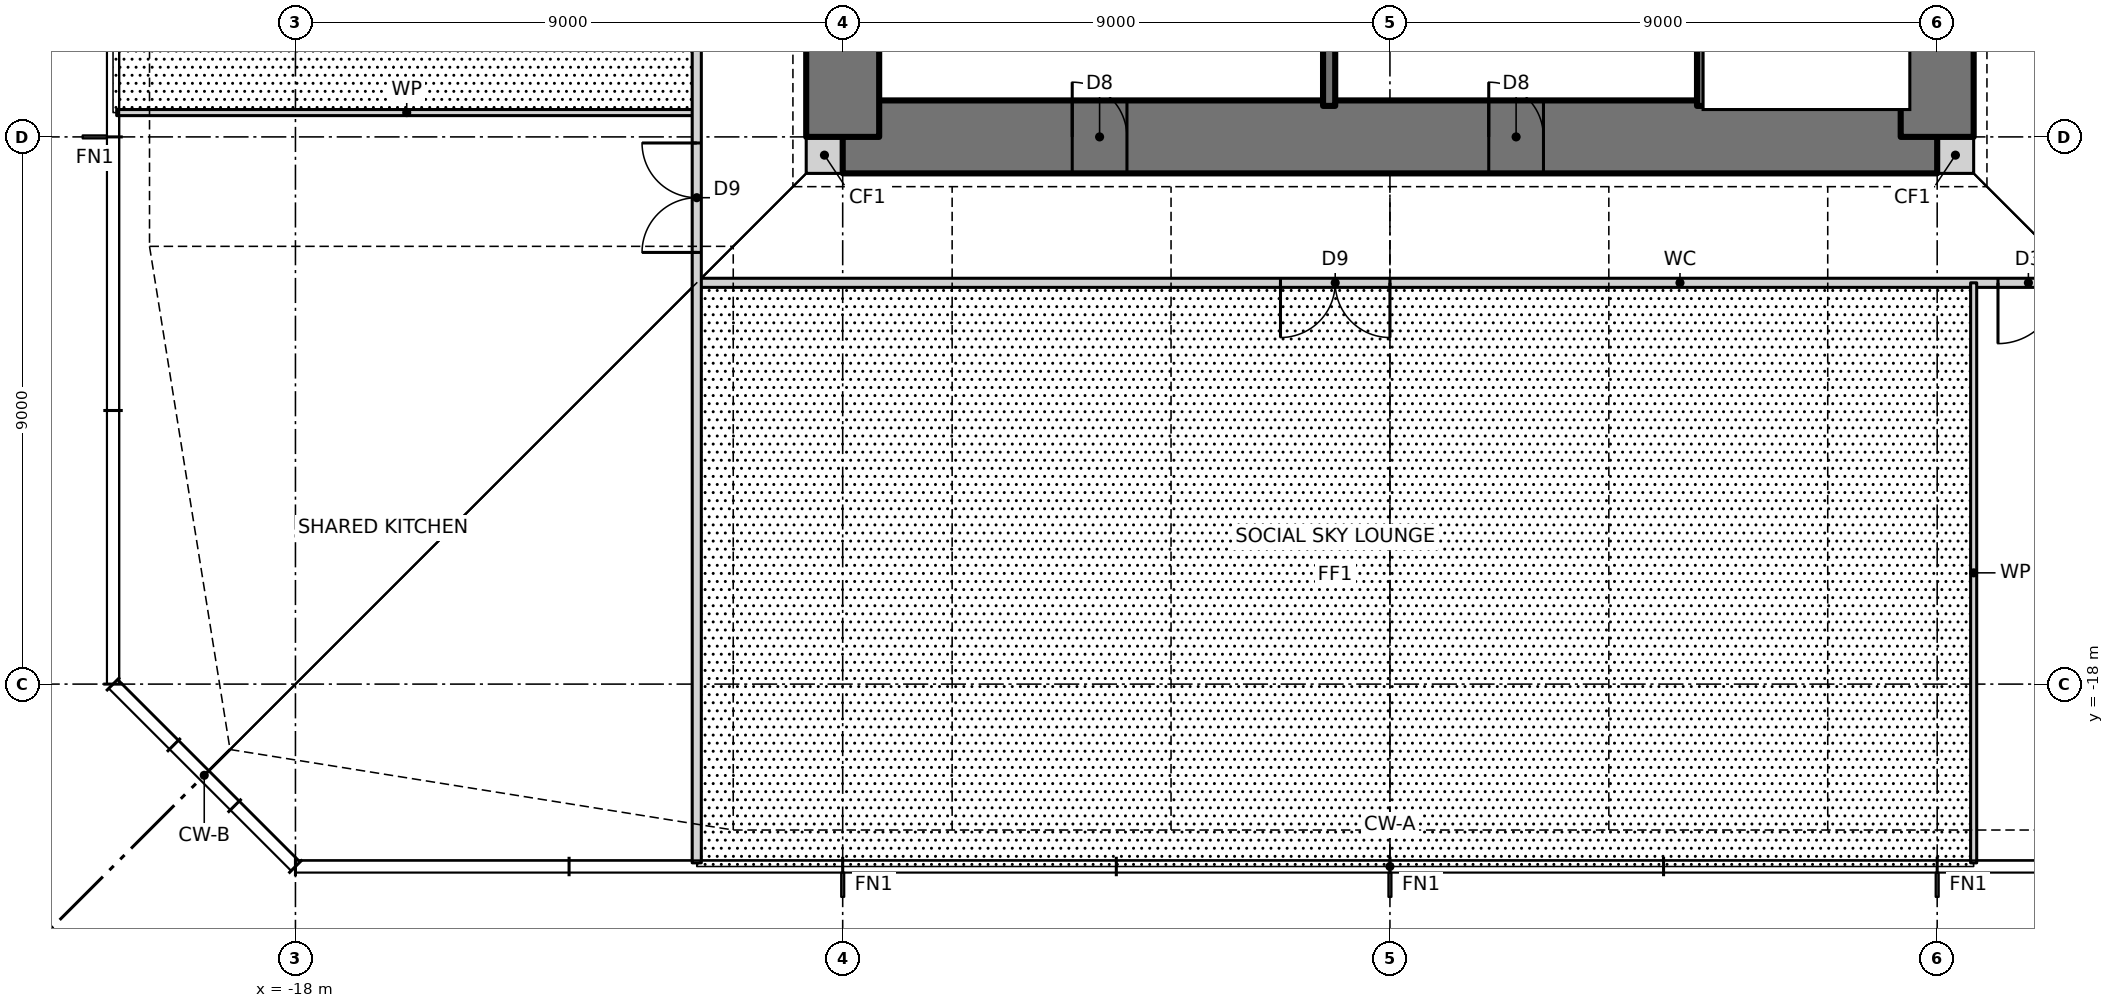
"""IFC4 building model, lengths in metres.
Left out: names, types, materials, properties, quantities, classifications, styles, units other than length and angle.
Written with IfcOpenShell. Run it as: python <this file> out.ifc"""

import sys

from ifc_helpers import new_model, si_unit, direction, frame, frame_2d, origin, place, context, subcontext, project, spatial, rectangle, extrude, element, fill, save


model = new_model("IFC4")
c1 = context("Model", 3, precision=1e-05, world=origin(), true_north=direction((0.0, 1.0)))
c2 = subcontext(c1, "Body", "Model", "MODEL_VIEW")
j1 = project(units=[si_unit("LENGTHUNIT", "METRE"), si_unit("PLANEANGLEUNIT", "RADIAN")], contexts=[c1])
p1 = place(None, origin())
s1 = spatial("IfcSite", under=j1, at=p1, CompositionType="ELEMENT")
p2 = place(p1, origin())
s2 = spatial("IfcBuilding", under=s1, at=p2, CompositionType="ELEMENT")
p3 = place(p2, frame((0.0, 0.0, 80.5)))
s3 = spatial("IfcBuildingStorey", under=s2, at=p3, CompositionType="ELEMENT", Elevation=80.5)
for number, where, z_axis, x_axis in (
    (1, (-9.6, -9.3, 0.0), (0.0, 0.0, 1.0), (1.0, 0.0, 0.0)),
    (2, (9.0, -9.3, 0.0), (0.0, 0.0, 1.0), (1.0, 0.0, 0.0)),
):
    element("IfcWall", number, at=place(p3, frame(where, z_axis=z_axis, x_axis=x_axis)), inside=s3, PredefinedType="SOLIDWALL", context=c2, shape_type="SweptSolid", body=[
        extrude(rectangle(XDim=0.6, YDim=0.6, at=frame_2d((0.3, 0.0))), origin(), (0.0, 0.0, 1.0), 3.5),
    ])
p4 = place(p3, frame((-9.0, -9.0, 0.0), z_axis=(0.0, 0.0, 1.0), x_axis=(1.0, 0.0, 0.0)))
e3 = element("IfcWall", 3, at=p4, inside=s3, PredefinedType="SHEAR", context=c2, shape_type="SweptSolid", body=[
    extrude(rectangle(XDim=18.0, YDim=1.2, at=frame_2d((9.0, 0.0))), origin(), (0.0, 0.0, 1.0), 3.5),
])
p5 = place(p4, frame((3.775, 0.0, 0.0)))
e4 = element("IfcOpeningElement", 4, at=p5, cuts=e3, PredefinedType="OPENING", context=c2, shape_type="SweptSolid", body=[
    extrude(rectangle(XDim=0.9, YDim=2.1, at=frame_2d((0.45, 1.05))), frame((0.0, 0.61, 0.0), z_axis=(0.0, -1.0, 0.0), x_axis=(1.0, 0.0, 0.0)), (0.0, 0.0, 1.0), 1.22),
])
p6 = place(p4, frame((10.625, 0.0, 0.0)))
e5 = element("IfcOpeningElement", 5, at=p6, cuts=e3, PredefinedType="OPENING", context=c2, shape_type="SweptSolid", body=[
    extrude(rectangle(XDim=0.9, YDim=2.1, at=frame_2d((0.45, 1.05))), frame((0.0, 0.61, 0.0), z_axis=(0.0, -1.0, 0.0), x_axis=(1.0, 0.0, 0.0)), (0.0, 0.0, 1.0), 1.22),
])
p7 = place(p3, frame((9.0, -9.0, 0.0), z_axis=(0.0, 0.0, 1.0), x_axis=(0.0, 1.0, 0.0)))
e6 = element("IfcWall", 6, at=p7, inside=s3, PredefinedType="SHEAR", context=c2, shape_type="SweptSolid", body=[
    extrude(rectangle(XDim=18.0, YDim=1.2, at=frame_2d((9.0, 0.0))), origin(), (0.0, 0.0, 1.0), 3.5),
])
p8 = place(p7, frame((8.5, 0.0, 0.0)))
e7 = element("IfcOpeningElement", 7, at=p8, cuts=e6, PredefinedType="OPENING", context=c2, shape_type="SweptSolid", body=[
    extrude(rectangle(XDim=1.0, YDim=2.1, at=frame_2d((0.5, 1.05))), frame((0.0, 0.61, 0.0), z_axis=(0.0, -1.0, 0.0), x_axis=(1.0, 0.0, 0.0)), (0.0, 0.0, 1.0), 1.22),
])
p9 = place(p3, frame((-9.0, 9.0, 0.0), z_axis=(0.0, 0.0, 1.0), x_axis=(0.0, -1.0, 0.0)))
e8 = element("IfcWall", 8, at=p9, inside=s3, PredefinedType="SHEAR", context=c2, shape_type="SweptSolid", body=[
    extrude(rectangle(XDim=18.0, YDim=1.2, at=frame_2d((9.0, 0.0))), origin(), (0.0, 0.0, 1.0), 3.5),
])
p10 = place(p9, frame((8.5, 0.0, 0.0)))
e9 = element("IfcOpeningElement", 9, at=p10, cuts=e8, PredefinedType="OPENING", context=c2, shape_type="SweptSolid", body=[
    extrude(rectangle(XDim=1.0, YDim=2.1, at=frame_2d((0.5, 1.05))), frame((0.0, 0.61, 0.0), z_axis=(0.0, -1.0, 0.0), x_axis=(1.0, 0.0, 0.0)), (0.0, 0.0, 1.0), 1.22),
])
p11 = place(p3, frame((-11.4, -11.4, 0.0), z_axis=(0.0, 0.0, 1.0), x_axis=(1.0, 0.0, 0.0)))
e10 = element("IfcWall", 10, at=p11, inside=s3, PredefinedType="PARTITIONING", context=c2, shape_type="SweptSolid", body=[
    extrude(rectangle(XDim=32.34, YDim=0.15, at=frame_2d((16.17, 0.0))), origin(), (0.0, 0.0, 1.0), 3.27),
])
p12 = place(p11, frame((9.6, 0.0, 0.0)))
e11 = element("IfcOpeningElement", 11, at=p12, cuts=e10, PredefinedType="OPENING", context=c2, shape_type="SweptSolid", body=[
    extrude(rectangle(XDim=1.8, YDim=2.1, at=frame_2d((0.9, 1.05))), frame((0.0, 0.085, 0.0), z_axis=(0.0, -1.0, 0.0), x_axis=(1.0, 0.0, 0.0)), (0.0, 0.0, 1.0), 0.17),
])
p13 = place(p11, frame((21.4, 0.0, 0.0)))
e12 = element("IfcOpeningElement", 12, at=p13, cuts=e10, PredefinedType="OPENING", context=c2, shape_type="SweptSolid", body=[
    extrude(rectangle(XDim=1.0, YDim=2.1, at=frame_2d((0.5, 1.05))), frame((0.0, 0.085, 0.0), z_axis=(0.0, -1.0, 0.0), x_axis=(1.0, 0.0, 0.0)), (0.0, 0.0, 1.0), 0.17),
])
for number, where, z_axis, x_axis in (
    (13, (-20.94, -8.6, 0.0), (0.0, 0.0, 1.0), (1.0, 0.0, 0.0)),
    (14, (9.6, -20.94, 0.0), (0.0, 0.0, 1.0), (0.0, 1.0, 0.0)),
):
    element("IfcWall", number, at=place(p3, frame(where, z_axis=z_axis, x_axis=x_axis)), inside=s3, PredefinedType="PARTITIONING", context=c2, shape_type="SweptSolid", body=[
        extrude(rectangle(XDim=9.54, YDim=0.1, at=frame_2d((4.77, 0.0))), origin(), (0.0, 0.0, 1.0), 3.27),
    ])
p14 = place(p3, frame((5.15, -8.49, 0.0), z_axis=(0.0, 0.0, 1.0), x_axis=(0.0, 1.0, 0.0)))
e15 = element("IfcWall", 15, at=p14, inside=s3, PredefinedType="SOLIDWALL", context=c2, shape_type="SweptSolid", body=[
    extrude(rectangle(XDim=13.09, YDim=0.2, at=frame_2d((6.545, 0.0))), origin(), (0.0, 0.0, 1.0), 3.5),
])
p15 = place(p14, frame((7.89, 0.0, 0.0)))
e16 = element("IfcOpeningElement", 16, at=p15, cuts=e15, PredefinedType="OPENING", context=c2, shape_type="SweptSolid", body=[
    extrude(rectangle(XDim=1.2, YDim=2.1, at=frame_2d((0.6, 1.05))), frame((0.0, 0.11, 0.0), z_axis=(0.0, -1.0, 0.0), x_axis=(1.0, 0.0, 0.0)), (0.0, 0.0, 1.0), 0.22),
])
p16 = place(p3, frame((-1.0, -8.49, 0.0), z_axis=(0.0, 0.0, 1.0), x_axis=(0.0, 1.0, 0.0)))
e17 = element("IfcWall", 17, at=p16, inside=s3, PredefinedType="SOLIDWALL", context=c2, shape_type="SweptSolid", body=[
    extrude(rectangle(XDim=4.09, YDim=0.2, at=frame_2d((2.045, 0.0))), origin(), (0.0, 0.0, 1.0), 3.5),
])
p17 = place(p3, frame((-11.4, -20.94, 0.0), z_axis=(0.0, 0.0, 1.0), x_axis=(0.0, 1.0, 0.0)))
e18 = element("IfcWall", 18, at=p17, inside=s3, PredefinedType="PARTITIONING", context=c2, shape_type="SweptSolid", body=[
    extrude(rectangle(XDim=32.34, YDim=0.15, at=frame_2d((16.17, 0.0))), origin(), (0.0, 0.0, 1.0), 3.27),
])
p18 = place(p17, frame((21.44, 0.0, 0.0)))
e19 = element("IfcOpeningElement", 19, at=p18, cuts=e18, PredefinedType="OPENING", context=c2, shape_type="SweptSolid", body=[
    extrude(rectangle(XDim=1.8, YDim=2.1, at=frame_2d((0.9, 1.05))), frame((0.0, 0.085, 0.0), z_axis=(0.0, -1.0, 0.0), x_axis=(1.0, 0.0, 0.0)), (0.0, 0.0, 1.0), 0.17),
])
p19 = place(p17, frame((10.04, 0.0, 0.0)))
e20 = element("IfcOpeningElement", 20, at=p19, cuts=e18, PredefinedType="OPENING", context=c2, shape_type="SweptSolid", body=[
    extrude(rectangle(XDim=1.8, YDim=2.1, at=frame_2d((0.9, 1.05))), frame((0.0, 0.085, 0.0), z_axis=(0.0, -1.0, 0.0), x_axis=(1.0, 0.0, 0.0)), (0.0, 0.0, 1.0), 0.17),
])
p20 = place(p12, frame((1.8, 0.0, 0.0), z_axis=(0.0, 0.0, 1.0), x_axis=(-1.0, 0.0, 0.0)))
e21 = element("IfcDoor", 21, at=p20, inside=s3, OperationType="DOUBLE_DOOR_SINGLE_SWING", PredefinedType="DOOR", context=c2, shape_type="SweptSolid", body=[
    extrude(rectangle(XDim=1.8, YDim=2.1, at=frame_2d((0.9, 1.05))), frame((0.0, 0.025, 0.0), z_axis=(0.0, -1.0, 0.0), x_axis=(1.0, 0.0, 0.0)), (0.0, 0.0, 1.0), 0.05),
])
fill(e11, e21)
p21 = place(p13, frame((1.0, 0.0, 0.0), z_axis=(0.0, 0.0, 1.0), x_axis=(-1.0, 0.0, 0.0)))
e22 = element("IfcDoor", 22, at=p21, inside=s3, OperationType="SINGLE_SWING_RIGHT", PredefinedType="DOOR", context=c2, shape_type="SweptSolid", body=[
    extrude(rectangle(XDim=1.0, YDim=2.1, at=frame_2d((0.5, 1.05))), frame((0.0, 0.025, 0.0), z_axis=(0.0, -1.0, 0.0), x_axis=(1.0, 0.0, 0.0)), (0.0, 0.0, 1.0), 0.05),
])
fill(e12, e22)
p22 = place(p19, origin())
e23 = element("IfcDoor", 23, at=p22, inside=s3, OperationType="DOUBLE_DOOR_SINGLE_SWING", PredefinedType="DOOR", context=c2, shape_type="SweptSolid", body=[
    extrude(rectangle(XDim=1.8, YDim=2.1, at=frame_2d((0.9, 1.05))), frame((0.0, 0.025, 0.0), z_axis=(0.0, -1.0, 0.0), x_axis=(1.0, 0.0, 0.0)), (0.0, 0.0, 1.0), 0.05),
])
fill(e20, e23)
p23 = place(p5, origin())
e24 = element("IfcDoor", 24, at=p23, inside=s3, OperationType="SINGLE_SWING_LEFT", PredefinedType="DOOR", context=c2, shape_type="SweptSolid", body=[
    extrude(rectangle(XDim=0.9, YDim=2.1, at=frame_2d((0.45, 1.05))), frame((0.0, 0.025, 0.0), z_axis=(0.0, -1.0, 0.0), x_axis=(1.0, 0.0, 0.0)), (0.0, 0.0, 1.0), 0.05),
])
fill(e4, e24)
p24 = place(p6, origin())
e25 = element("IfcDoor", 25, at=p24, inside=s3, OperationType="SINGLE_SWING_LEFT", PredefinedType="DOOR", context=c2, shape_type="SweptSolid", body=[
    extrude(rectangle(XDim=0.9, YDim=2.1, at=frame_2d((0.45, 1.05))), frame((0.0, 0.025, 0.0), z_axis=(0.0, -1.0, 0.0), x_axis=(1.0, 0.0, 0.0)), (0.0, 0.0, 1.0), 0.05),
])
fill(e5, e25)
save(model, sys.argv[1])
